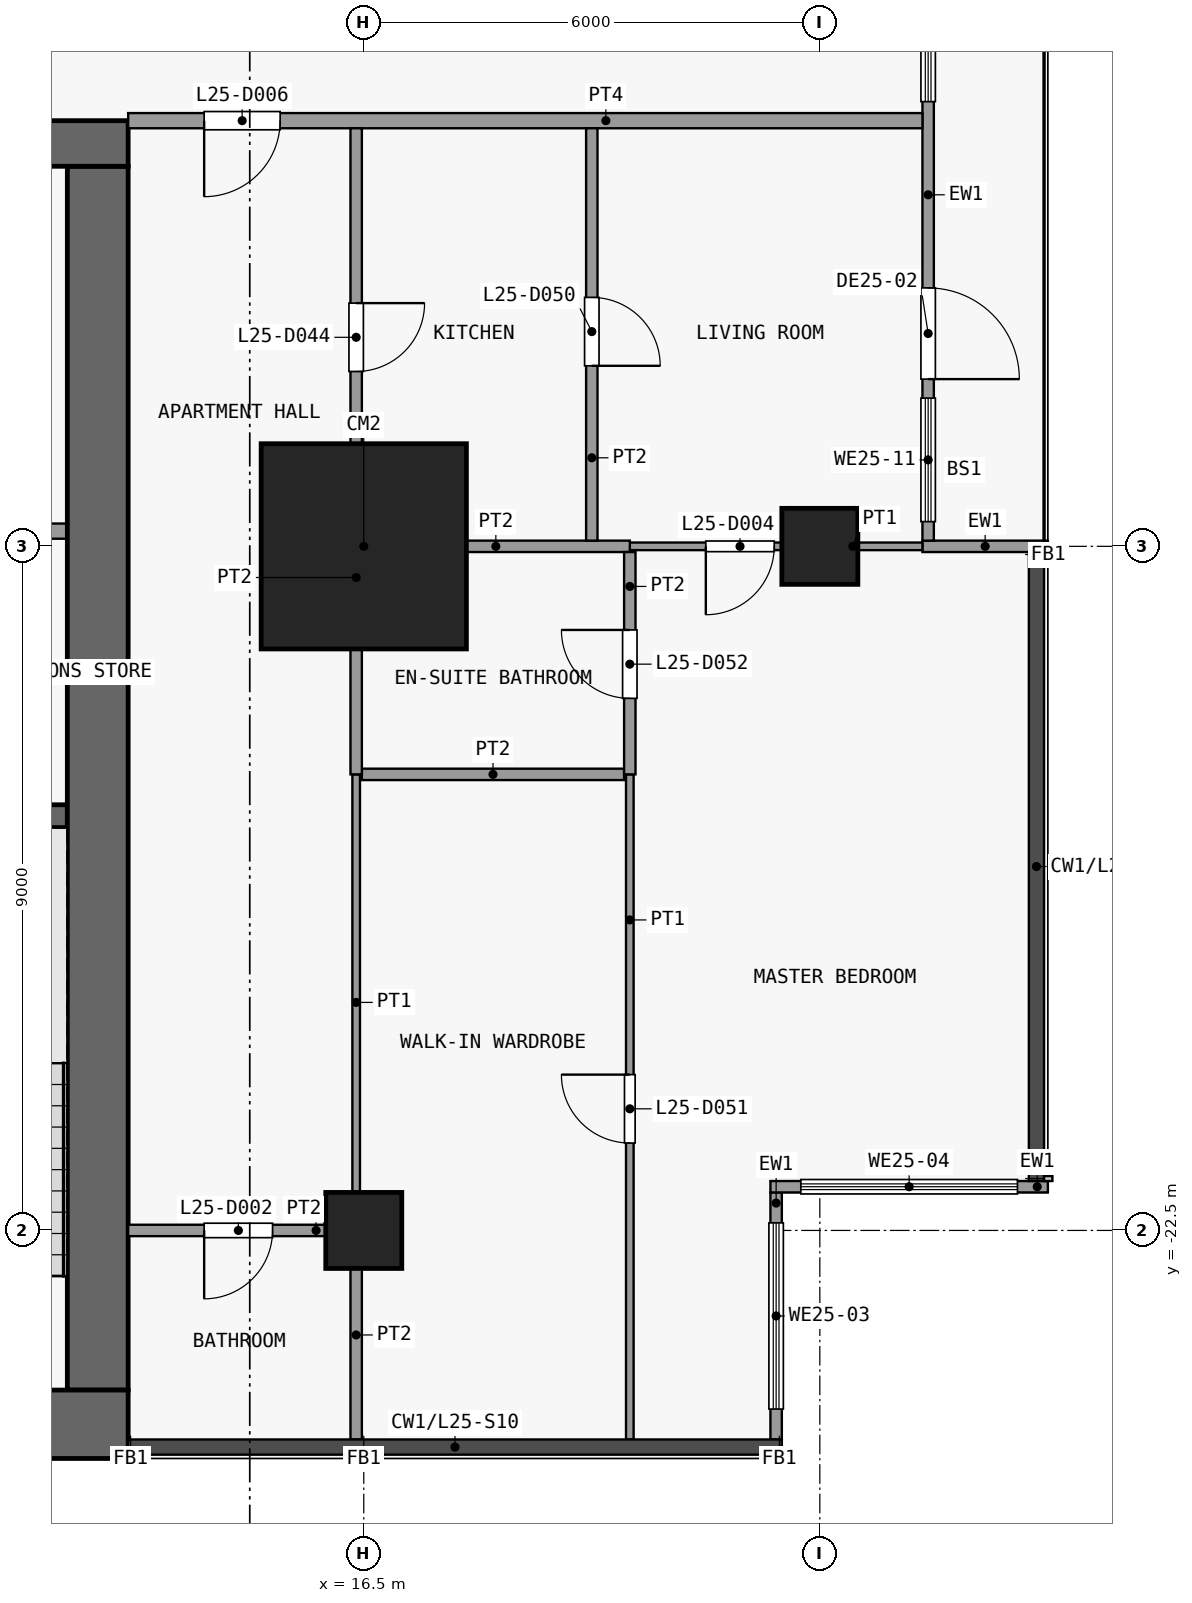
"""IFC4 building model, lengths in metres.
Left out: names, types, materials, properties, quantities, classifications, styles, units other than length and angle.
Written with IfcOpenShell. Run it as: python <this file> out.ifc"""

import sys

from ifc_helpers import new_model, si_unit, direction, frame, frame_2d, origin, origin_2d, place, context, subcontext, project, spatial, rectangle, extrude, element, fill, save


model = new_model("IFC4")
c1 = context("Model", 3, precision=1e-05, world=origin(), true_north=direction((0.0, 1.0)))
c2 = subcontext(c1, "Body", "Model", "MODEL_VIEW")
j1 = project(units=[si_unit("LENGTHUNIT", "METRE"), si_unit("PLANEANGLEUNIT", "RADIAN")], contexts=[c1])
p1 = place(None, origin())
s1 = spatial("IfcSite", under=j1, at=p1, CompositionType="ELEMENT")
p2 = place(p1, origin())
s2 = spatial("IfcBuilding", under=s1, at=p2, CompositionType="ELEMENT")
p3 = place(p2, frame((0.0, 0.0, 102.7)))
s3 = spatial("IfcBuildingStorey", under=s2, at=p3, CompositionType="ELEMENT", Elevation=102.7)
p4 = place(p3, frame((16.5, -22.5, 0.0), z_axis=(0.0, 0.0, 1.0), x_axis=(1.0, 0.0, 0.0)))
e1 = element("IfcColumn", 1, at=p4, inside=s3, PredefinedType="COLUMN", context=c2, shape_type="SweptSolid", body=[
    extrude(rectangle(XDim=1.0, YDim=1.0, at=origin_2d()), origin(), (0.0, 0.0, 1.0), 3.6),
])
p5 = place(p3, frame((16.5, -13.5, 0.0), z_axis=(0.0, 0.0, 1.0), x_axis=(1.0, 0.0, 0.0)))
e2 = element("IfcColumn", 2, at=p5, inside=s3, PredefinedType="COLUMN", context=c2, shape_type="SweptSolid", body=[
    extrude(rectangle(XDim=2.7, YDim=2.7, at=origin_2d()), origin(), (0.0, 0.0, 1.0), 3.6),
])
p6 = place(p3, frame((22.5, -13.5, 0.0), z_axis=(0.0, 0.0, 1.0), x_axis=(1.0, 0.0, 0.0)))
e3 = element("IfcColumn", 3, at=p6, inside=s3, PredefinedType="COLUMN", context=c2, shape_type="SweptSolid", body=[
    extrude(rectangle(XDim=1.0, YDim=1.0, at=origin_2d()), origin(), (0.0, 0.0, 1.0), 3.6),
])
p7 = place(p3, frame((-13.4, -25.05, 0.0), z_axis=(0.0, 0.0, 1.0), x_axis=(1.0, 0.0, 0.0)))
e4 = element("IfcWall", 4, at=p7, inside=s3, PredefinedType="SHEAR", context=c2, shape_type="SweptSolid", body=[
    extrude(rectangle(XDim=26.8, YDim=0.9, at=frame_2d((13.4, 0.0))), origin(), (0.0, 0.0, 1.0), 3.3),
])
p8 = place(p3, frame((-13.4, -8.2, 0.0), z_axis=(0.0, 0.0, 1.0), x_axis=(1.0, 0.0, 0.0)))
e5 = element("IfcWall", 5, at=p8, inside=s3, PredefinedType="SHEAR", context=c2, shape_type="SweptSolid", body=[
    extrude(rectangle(XDim=26.8, YDim=0.6, at=frame_2d((13.4, 0.0))), origin(), (0.0, 0.0, 1.0), 3.3),
])
p9 = place(p8, frame((7.7, 0.0, 0.0)))
e6 = element("IfcOpeningElement", 6, at=p9, cuts=e5, PredefinedType="OPENING", context=c2, shape_type="SweptSolid", body=[
    extrude(rectangle(XDim=1.8, YDim=2.1, at=frame_2d((0.9, 1.05))), frame((0.0, 0.31, 0.0), z_axis=(0.0, -1.0, 0.0), x_axis=(1.0, 0.0, 0.0)), (0.0, 0.0, 1.0), 0.62),
])
p10 = place(p8, frame((17.3, 0.0, 0.0)))
e7 = element("IfcOpeningElement", 7, at=p10, cuts=e5, PredefinedType="OPENING", context=c2, shape_type="SweptSolid", body=[
    extrude(rectangle(XDim=1.8, YDim=2.1, at=frame_2d((0.9, 1.05))), frame((0.0, 0.31, 0.0), z_axis=(0.0, -1.0, 0.0), x_axis=(1.0, 0.0, 0.0)), (0.0, 0.0, 1.0), 0.62),
])
p11 = place(p8, frame((2.625, 0.0, 0.0)))
e8 = element("IfcOpeningElement", 8, at=p11, cuts=e5, PredefinedType="OPENING", context=c2, shape_type="SweptSolid", body=[
    extrude(rectangle(XDim=0.9, YDim=2.1, at=frame_2d((0.45, 1.05))), frame((0.0, 0.31, 0.0), z_axis=(0.0, -1.0, 0.0), x_axis=(1.0, 0.0, 0.0)), (0.0, 0.0, 1.0), 0.62),
])
p12 = place(p8, frame((23.275, 0.0, 0.0)))
e9 = element("IfcOpeningElement", 9, at=p12, cuts=e5, PredefinedType="OPENING", context=c2, shape_type="SweptSolid", body=[
    extrude(rectangle(XDim=0.9, YDim=2.1, at=frame_2d((0.45, 1.05))), frame((0.0, 0.31, 0.0), z_axis=(0.0, -1.0, 0.0), x_axis=(1.0, 0.0, 0.0)), (0.0, 0.0, 1.0), 0.62),
])
p13 = place(p3, frame((13.0, -24.6, 0.0), z_axis=(0.0, 0.0, 1.0), x_axis=(0.0, 1.0, 0.0)))
e10 = element("IfcWall", 10, at=p13, inside=s3, PredefinedType="SHEAR", context=c2, shape_type="SweptSolid", body=[
    extrude(rectangle(XDim=16.1, YDim=0.8, at=frame_2d((8.05, 0.0))), origin(), (0.0, 0.0, 1.0), 3.3),
])
p14 = place(p3, frame((9.5, -17.05, 0.0), z_axis=(0.0, 0.0, 1.0), x_axis=(1.0, 0.0, 0.0)))
e11 = element("IfcWall", 11, at=p14, inside=s3, PredefinedType="SHEAR", context=c2, shape_type="SweptSolid", body=[
    extrude(rectangle(XDim=3.1, YDim=0.3, at=frame_2d((1.55, 0.0))), origin(), (0.0, 0.0, 1.0), 3.3),
])
p15 = place(p3, frame((11.15, -13.3, 0.0), z_axis=(0.0, 0.0, 1.0), x_axis=(1.0, 0.0, 0.0)))
e12 = element("IfcWall", 12, at=p15, inside=s3, PredefinedType="PARTITIONING", context=c2, shape_type="SweptSolid", body=[
    extrude(rectangle(XDim=1.45, YDim=0.2, at=frame_2d((0.725, 0.0))), origin(), (0.0, 0.0, 1.0), 3.3),
])
p16 = place(p3, frame((21.925, -22.0, 0.0), z_axis=(0.0, 0.0, 1.0), x_axis=(0.0, -1.0, 0.0)))
e13 = element("IfcWall", 13, at=p16, inside=s3, PredefinedType="SOLIDWALL", context=c2, shape_type="SweptSolid", body=[
    extrude(rectangle(XDim=3.25, YDim=0.15, at=frame_2d((1.625, 0.0))), origin(), (0.0, 0.0, 1.0), 3.3),
])
p17 = place(p16, frame((0.4, 0.0, 0.9)))
e14 = element("IfcOpeningElement", 14, at=p17, cuts=e13, PredefinedType="OPENING", context=c2, shape_type="SweptSolid", body=[
    extrude(rectangle(XDim=2.45, YDim=2.4, at=frame_2d((1.225, 1.2))), frame((0.0, 0.085, 0.0), z_axis=(0.0, -1.0, 0.0), x_axis=(1.0, 0.0, 0.0)), (0.0, 0.0, 1.0), 0.17),
])
p18 = place(p3, frame((25.5, -21.925, 0.0), z_axis=(0.0, 0.0, 1.0), x_axis=(-1.0, 0.0, 0.0)))
e15 = element("IfcWall", 15, at=p18, inside=s3, PredefinedType="SOLIDWALL", context=c2, shape_type="SweptSolid", body=[
    extrude(rectangle(XDim=3.65, YDim=0.15, at=frame_2d((1.825, 0.0))), origin(), (0.0, 0.0, 1.0), 3.3),
])
p19 = place(p18, frame((0.4, 0.0, 0.9)))
e16 = element("IfcOpeningElement", 16, at=p19, cuts=e15, PredefinedType="OPENING", context=c2, shape_type="SweptSolid", body=[
    extrude(rectangle(XDim=2.85, YDim=2.4, at=frame_2d((1.425, 1.2))), frame((0.0, 0.085, 0.0), z_axis=(0.0, -1.0, 0.0), x_axis=(1.0, 0.0, 0.0)), (0.0, 0.0, 1.0), 0.17),
])
p20 = place(p3, frame((23.85, -13.5, 0.0), z_axis=(0.0, 0.0, 1.0), x_axis=(1.0, 0.0, 0.0)))
e17 = element("IfcWall", 17, at=p20, inside=s3, PredefinedType="SOLIDWALL", context=c2, shape_type="SweptSolid", body=[
    extrude(rectangle(XDim=1.65, YDim=0.15, at=frame_2d((0.825, 0.0))), origin(), (0.0, 0.0, 1.0), 3.3),
])
p21 = place(p3, frame((23.925, -4.575, 0.0), z_axis=(0.0, 0.0, 1.0), x_axis=(0.0, -1.0, 0.0)))
e18 = element("IfcWall", 18, at=p21, inside=s3, PredefinedType="SOLIDWALL", context=c2, shape_type="SweptSolid", body=[
    extrude(rectangle(XDim=8.85, YDim=0.15, at=frame_2d((4.425, 0.0))), origin(), (0.0, 0.0, 1.0), 3.3),
])
p22 = place(p21, frame((5.525, 0.0, 0.0)))
e19 = element("IfcOpeningElement", 19, at=p22, cuts=e18, PredefinedType="OPENING", context=c2, shape_type="SweptSolid", body=[
    extrude(rectangle(XDim=1.2, YDim=2.4, at=frame_2d((0.6, 1.2))), frame((0.0, 0.085, 0.0), z_axis=(0.0, -1.0, 0.0), x_axis=(1.0, 0.0, 0.0)), (0.0, 0.0, 1.0), 0.17),
])
p23 = place(p21, frame((6.975, 0.0, 0.9)))
e20 = element("IfcOpeningElement", 20, at=p23, cuts=e18, PredefinedType="OPENING", context=c2, shape_type="SweptSolid", body=[
    extrude(rectangle(XDim=1.625, YDim=2.1, at=frame_2d((0.812, 1.05))), frame((0.0, 0.085, 0.0), z_axis=(0.0, -1.0, 0.0), x_axis=(1.0, 0.0, 0.0)), (0.0, 0.0, 1.0), 0.17),
])
p24 = place(p21, frame((1.263, 0.0, 0.9)))
e21 = element("IfcOpeningElement", 21, at=p24, cuts=e18, PredefinedType="OPENING", context=c2, shape_type="SweptSolid", body=[
    extrude(rectangle(XDim=1.812, YDim=2.1, at=frame_2d((0.906, 1.05))), frame((0.0, 0.085, 0.0), z_axis=(0.0, -1.0, 0.0), x_axis=(1.0, 0.0, 0.0)), (0.0, 0.0, 1.0), 0.17),
])
p25 = place(p3, frame((13.4, -22.5, 0.0), z_axis=(0.0, 0.0, 1.0), x_axis=(1.0, 0.0, 0.0)))
e22 = element("IfcWall", 22, at=p25, inside=s3, PredefinedType="PARTITIONING", context=c2, shape_type="SweptSolid", body=[
    extrude(rectangle(XDim=2.925, YDim=0.15, at=frame_2d((1.462, 0.0))), origin(), (0.0, 0.0, 1.0), 3.3),
])
p26 = place(p25, frame((1.0, 0.0, 0.0)))
e23 = element("IfcOpeningElement", 23, at=p26, cuts=e22, PredefinedType="OPENING", context=c2, shape_type="SweptSolid", body=[
    extrude(rectangle(XDim=0.9, YDim=2.1, at=frame_2d((0.45, 1.05))), frame((0.0, 0.085, 0.0), z_axis=(0.0, -1.0, 0.0), x_axis=(1.0, 0.0, 0.0)), (0.0, 0.0, 1.0), 0.17),
])
p27 = place(p3, frame((16.475, -16.5, 0.0), z_axis=(0.0, 0.0, 1.0), x_axis=(1.0, 0.0, 0.0)))
e24 = element("IfcWall", 24, at=p27, inside=s3, PredefinedType="PARTITIONING", context=c2, shape_type="SweptSolid", body=[
    extrude(rectangle(XDim=3.45, YDim=0.15, at=frame_2d((1.725, 0.0))), origin(), (0.0, 0.0, 1.0), 3.3),
])
p28 = place(p3, frame((20.0, -13.5, 0.0), z_axis=(0.0, 0.0, 1.0), x_axis=(1.0, 0.0, 0.0)))
e25 = element("IfcWall", 25, at=p28, inside=s3, PredefinedType="PARTITIONING", context=c2, shape_type="SweptSolid", body=[
    extrude(rectangle(XDim=3.85, YDim=0.1, at=frame_2d((1.925, 0.0))), origin(), (0.0, 0.0, 1.0), 3.3),
])
p29 = place(p28, frame((1.0, 0.0, 0.0)))
e26 = element("IfcOpeningElement", 26, at=p29, cuts=e25, PredefinedType="OPENING", context=c2, shape_type="SweptSolid", body=[
    extrude(rectangle(XDim=0.9, YDim=2.1, at=frame_2d((0.45, 1.05))), frame((0.0, 0.06, 0.0), z_axis=(0.0, -1.0, 0.0), x_axis=(1.0, 0.0, 0.0)), (0.0, 0.0, 1.0), 0.12),
])
p30 = place(p3, frame((16.475, -13.5, 0.0), z_axis=(0.0, 0.0, 1.0), x_axis=(1.0, 0.0, 0.0)))
e27 = element("IfcWall", 27, at=p30, inside=s3, PredefinedType="PARTITIONING", context=c2, shape_type="SweptSolid", body=[
    extrude(rectangle(XDim=3.525, YDim=0.15, at=frame_2d((1.762, 0.0))), origin(), (0.0, 0.0, 1.0), 3.3),
])
p31 = place(p3, frame((13.4, -7.9, 0.0), z_axis=(0.0, 0.0, 1.0), x_axis=(1.0, 0.0, 0.0)))
e28 = element("IfcWall", 28, at=p31, inside=s3, PredefinedType="PARTITIONING", context=c2, shape_type="SweptSolid", body=[
    extrude(rectangle(XDim=10.45, YDim=0.2, at=frame_2d((5.225, 0.0))), origin(), (0.0, 0.0, 1.0), 3.3),
])
p32 = place(p31, frame((1.0, 0.0, 0.0)))
e29 = element("IfcOpeningElement", 29, at=p32, cuts=e28, PredefinedType="OPENING", context=c2, shape_type="SweptSolid", body=[
    extrude(rectangle(XDim=1.0, YDim=2.1, at=frame_2d((0.5, 1.05))), frame((0.0, 0.11, 0.0), z_axis=(0.0, -1.0, 0.0), x_axis=(1.0, 0.0, 0.0)), (0.0, 0.0, 1.0), 0.22),
])
p33 = place(p3, frame((16.4, -22.5, 0.0), z_axis=(0.0, 0.0, 1.0), x_axis=(0.0, 1.0, 0.0)))
e30 = element("IfcWall", 30, at=p33, inside=s3, PredefinedType="PARTITIONING", context=c2, shape_type="SweptSolid", body=[
    extrude(rectangle(XDim=6.0, YDim=0.1, at=frame_2d((3.0, 0.0))), origin(), (0.0, 0.0, 1.0), 3.3),
])
p34 = place(p3, frame((16.4, -25.25, 0.0), z_axis=(0.0, 0.0, 1.0), x_axis=(0.0, 1.0, 0.0)))
e31 = element("IfcWall", 31, at=p34, inside=s3, PredefinedType="PARTITIONING", context=c2, shape_type="SweptSolid", body=[
    extrude(rectangle(XDim=2.75, YDim=0.15, at=frame_2d((1.375, 0.0))), origin(), (0.0, 0.0, 1.0), 3.3),
])
p35 = place(p3, frame((16.4, -16.5, 0.0), z_axis=(0.0, 0.0, 1.0), x_axis=(0.0, 1.0, 0.0)))
e32 = element("IfcWall", 32, at=p35, inside=s3, PredefinedType="PARTITIONING", context=c2, shape_type="SweptSolid", body=[
    extrude(rectangle(XDim=8.5, YDim=0.15, at=frame_2d((4.25, 0.0))), origin(), (0.0, 0.0, 1.0), 3.3),
])
p36 = place(p35, frame((5.3, 0.0, 0.0)))
e33 = element("IfcOpeningElement", 33, at=p36, cuts=e32, PredefinedType="OPENING", context=c2, shape_type="SweptSolid", body=[
    extrude(rectangle(XDim=0.9, YDim=2.1, at=frame_2d((0.45, 1.05))), frame((0.0, 0.085, 0.0), z_axis=(0.0, -1.0, 0.0), x_axis=(1.0, 0.0, 0.0)), (0.0, 0.0, 1.0), 0.17),
])
p37 = place(p3, frame((19.5, -13.425, 0.0), z_axis=(0.0, 0.0, 1.0), x_axis=(0.0, 1.0, 0.0)))
e34 = element("IfcWall", 34, at=p37, inside=s3, PredefinedType="PARTITIONING", context=c2, shape_type="SweptSolid", body=[
    extrude(rectangle(XDim=5.425, YDim=0.15, at=frame_2d((2.712, 0.0))), origin(), (0.0, 0.0, 1.0), 3.3),
])
p38 = place(p37, frame((2.3, 0.0, 0.0)))
e35 = element("IfcOpeningElement", 35, at=p38, cuts=e34, PredefinedType="OPENING", context=c2, shape_type="SweptSolid", body=[
    extrude(rectangle(XDim=0.9, YDim=2.1, at=frame_2d((0.45, 1.05))), frame((0.0, 0.085, 0.0), z_axis=(0.0, -1.0, 0.0), x_axis=(1.0, 0.0, 0.0)), (0.0, 0.0, 1.0), 0.17),
])
p39 = place(p3, frame((20.0, -25.25, 0.0), z_axis=(0.0, 0.0, 1.0), x_axis=(0.0, 1.0, 0.0)))
e36 = element("IfcWall", 36, at=p39, inside=s3, PredefinedType="PARTITIONING", context=c2, shape_type="SweptSolid", body=[
    extrude(rectangle(XDim=8.75, YDim=0.1, at=frame_2d((4.375, 0.0))), origin(), (0.0, 0.0, 1.0), 3.3),
])
p40 = place(p39, frame((3.9, 0.0, 0.0)))
e37 = element("IfcOpeningElement", 37, at=p40, cuts=e36, PredefinedType="OPENING", context=c2, shape_type="SweptSolid", body=[
    extrude(rectangle(XDim=0.9, YDim=2.1, at=frame_2d((0.45, 1.05))), frame((0.0, 0.06, 0.0), z_axis=(0.0, -1.0, 0.0), x_axis=(1.0, 0.0, 0.0)), (0.0, 0.0, 1.0), 0.12),
])
p41 = place(p3, frame((20.0, -16.5, 0.0), z_axis=(0.0, 0.0, 1.0), x_axis=(0.0, 1.0, 0.0)))
e38 = element("IfcWall", 38, at=p41, inside=s3, PredefinedType="PARTITIONING", context=c2, shape_type="SweptSolid", body=[
    extrude(rectangle(XDim=2.925, YDim=0.15, at=frame_2d((1.462, 0.0))), origin(), (0.0, 0.0, 1.0), 3.3),
])
p42 = place(p41, frame((1.0, 0.0, 0.0)))
e39 = element("IfcOpeningElement", 39, at=p42, cuts=e38, PredefinedType="OPENING", context=c2, shape_type="SweptSolid", body=[
    extrude(rectangle(XDim=0.9, YDim=2.1, at=frame_2d((0.45, 1.05))), frame((0.0, 0.085, 0.0), z_axis=(0.0, -1.0, 0.0), x_axis=(1.0, 0.0, 0.0)), (0.0, 0.0, 1.0), 0.17),
])
p43 = place(p17, origin())
e40 = element("IfcWindow", 40, at=p43, inside=s3, PartitioningType="SINGLE_PANEL", PredefinedType="WINDOW", context=c2, shape_type="SweptSolid", body=[
    extrude(rectangle(XDim=2.45, YDim=2.4, at=frame_2d((1.225, 1.2))), frame((0.0, 0.03, 0.0), z_axis=(0.0, -1.0, 0.0), x_axis=(1.0, 0.0, 0.0)), (0.0, 0.0, 1.0), 0.06),
])
fill(e14, e40)
p44 = place(p19, origin())
e41 = element("IfcWindow", 41, at=p44, inside=s3, PartitioningType="SINGLE_PANEL", PredefinedType="WINDOW", context=c2, shape_type="SweptSolid", body=[
    extrude(rectangle(XDim=2.85, YDim=2.4, at=frame_2d((1.425, 1.2))), frame((0.0, 0.03, 0.0), z_axis=(0.0, -1.0, 0.0), x_axis=(1.0, 0.0, 0.0)), (0.0, 0.0, 1.0), 0.06),
])
fill(e16, e41)
p45 = place(p22, origin())
e42 = element("IfcDoor", 42, at=p45, inside=s3, OperationType="SINGLE_SWING_RIGHT", PredefinedType="DOOR", context=c2, shape_type="SweptSolid", body=[
    extrude(rectangle(XDim=1.2, YDim=2.4, at=frame_2d((0.6, 1.2))), frame((0.0, 0.025, 0.0), z_axis=(0.0, -1.0, 0.0), x_axis=(1.0, 0.0, 0.0)), (0.0, 0.0, 1.0), 0.05),
])
fill(e19, e42)
p46 = place(p23, origin())
e43 = element("IfcWindow", 43, at=p46, inside=s3, PartitioningType="SINGLE_PANEL", PredefinedType="WINDOW", context=c2, shape_type="SweptSolid", body=[
    extrude(rectangle(XDim=1.625, YDim=2.1, at=frame_2d((0.812, 1.05))), frame((0.0, 0.03, 0.0), z_axis=(0.0, -1.0, 0.0), x_axis=(1.0, 0.0, 0.0)), (0.0, 0.0, 1.0), 0.06),
])
fill(e20, e43)
p47 = place(p24, origin())
e44 = element("IfcWindow", 44, at=p47, inside=s3, PartitioningType="SINGLE_PANEL", PredefinedType="WINDOW", context=c2, shape_type="SweptSolid", body=[
    extrude(rectangle(XDim=1.812, YDim=2.1, at=frame_2d((0.906, 1.05))), frame((0.0, 0.03, 0.0), z_axis=(0.0, -1.0, 0.0), x_axis=(1.0, 0.0, 0.0)), (0.0, 0.0, 1.0), 0.06),
])
fill(e21, e44)
p48 = place(p26, origin())
e45 = element("IfcDoor", 45, at=p48, inside=s3, OperationType="SINGLE_SWING_LEFT", PredefinedType="DOOR", context=c2, shape_type="SweptSolid", body=[
    extrude(rectangle(XDim=0.9, YDim=2.1, at=frame_2d((0.45, 1.05))), frame((0.0, 0.025, 0.0), z_axis=(0.0, -1.0, 0.0), x_axis=(1.0, 0.0, 0.0)), (0.0, 0.0, 1.0), 0.05),
])
fill(e23, e45)
p49 = place(p29, origin())
e46 = element("IfcDoor", 46, at=p49, inside=s3, OperationType="SINGLE_SWING_LEFT", PredefinedType="DOOR", context=c2, shape_type="SweptSolid", body=[
    extrude(rectangle(XDim=0.9, YDim=2.1, at=frame_2d((0.45, 1.05))), frame((0.0, 0.025, 0.0), z_axis=(0.0, -1.0, 0.0), x_axis=(1.0, 0.0, 0.0)), (0.0, 0.0, 1.0), 0.05),
])
fill(e26, e46)
p50 = place(p32, origin())
e47 = element("IfcDoor", 47, at=p50, inside=s3, OperationType="SINGLE_SWING_LEFT", PredefinedType="DOOR", context=c2, shape_type="SweptSolid", body=[
    extrude(rectangle(XDim=1.0, YDim=2.1, at=frame_2d((0.5, 1.05))), frame((0.0, 0.025, 0.0), z_axis=(0.0, -1.0, 0.0), x_axis=(1.0, 0.0, 0.0)), (0.0, 0.0, 1.0), 0.05),
])
fill(e29, e47)
p51 = place(p36, origin())
e48 = element("IfcDoor", 48, at=p51, inside=s3, OperationType="SINGLE_SWING_RIGHT", PredefinedType="DOOR", context=c2, shape_type="SweptSolid", body=[
    extrude(rectangle(XDim=0.9, YDim=2.1, at=frame_2d((0.45, 1.05))), frame((0.0, 0.025, 0.0), z_axis=(0.0, -1.0, 0.0), x_axis=(1.0, 0.0, 0.0)), (0.0, 0.0, 1.0), 0.05),
])
fill(e33, e48)
p52 = place(p38, origin())
e49 = element("IfcDoor", 49, at=p52, inside=s3, OperationType="SINGLE_SWING_LEFT", PredefinedType="DOOR", context=c2, shape_type="SweptSolid", body=[
    extrude(rectangle(XDim=0.9, YDim=2.1, at=frame_2d((0.45, 1.05))), frame((0.0, 0.025, 0.0), z_axis=(0.0, -1.0, 0.0), x_axis=(1.0, 0.0, 0.0)), (0.0, 0.0, 1.0), 0.05),
])
fill(e35, e49)
p53 = place(p40, origin())
e50 = element("IfcDoor", 50, at=p53, inside=s3, OperationType="SINGLE_SWING_LEFT", PredefinedType="DOOR", context=c2, shape_type="SweptSolid", body=[
    extrude(rectangle(XDim=0.9, YDim=2.1, at=frame_2d((0.45, 1.05))), frame((0.0, 0.025, 0.0), z_axis=(0.0, -1.0, 0.0), x_axis=(1.0, 0.0, 0.0)), (0.0, 0.0, 1.0), 0.05),
])
fill(e37, e50)
p54 = place(p42, origin())
e51 = element("IfcDoor", 51, at=p54, inside=s3, OperationType="SINGLE_SWING_LEFT", PredefinedType="DOOR", context=c2, shape_type="SweptSolid", body=[
    extrude(rectangle(XDim=0.9, YDim=2.1, at=frame_2d((0.45, 1.05))), frame((0.0, 0.025, 0.0), z_axis=(0.0, -1.0, 0.0), x_axis=(1.0, 0.0, 0.0)), (0.0, 0.0, 1.0), 0.05),
])
fill(e39, e51)
save(model, sys.argv[1])
